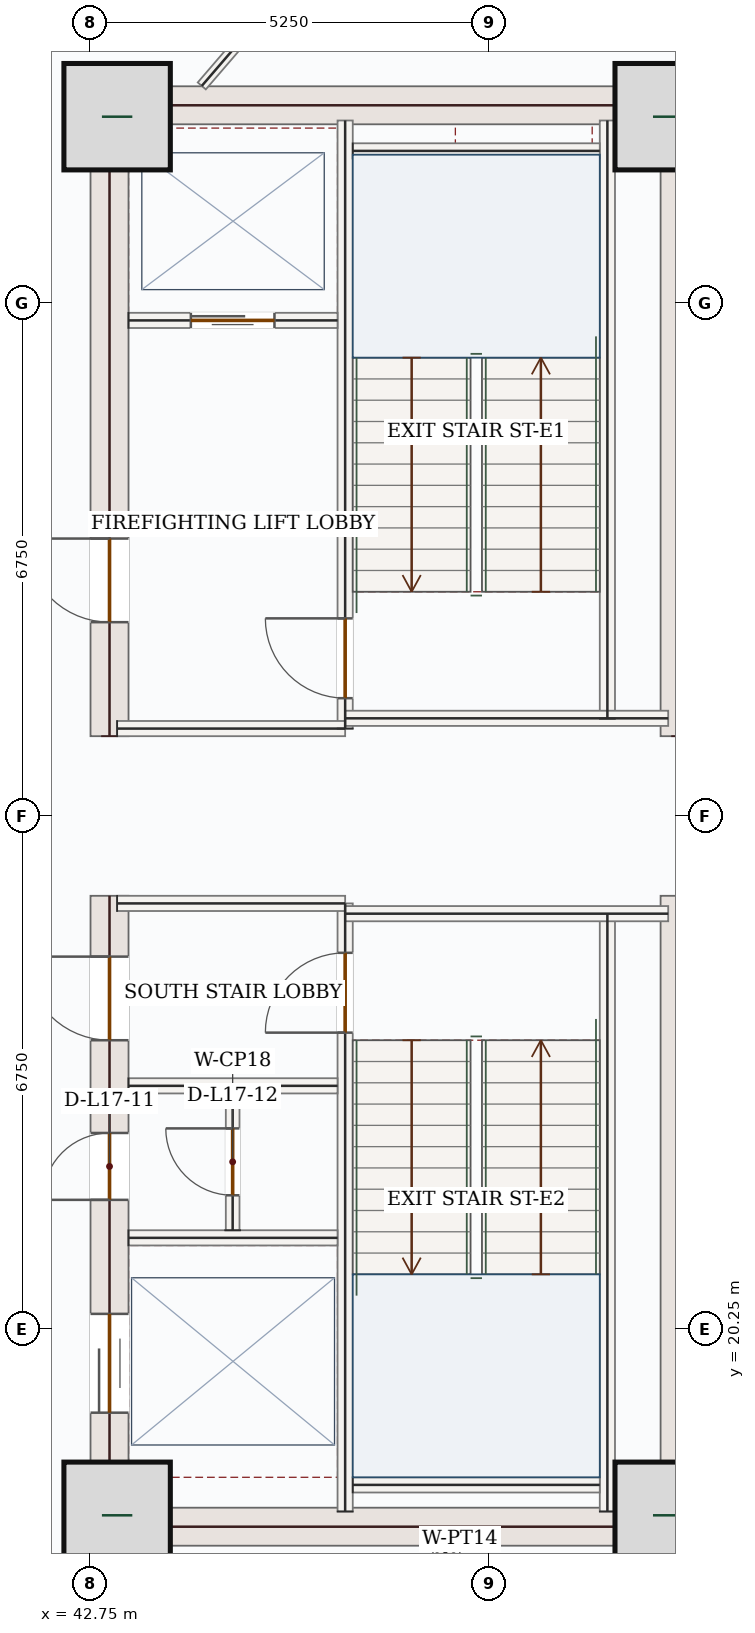
"""IFC4 building model, lengths in metres.
Left out: names, types, materials, properties, quantities, classifications, styles, units other than length and angle.
Written with IfcOpenShell. Run it as: python <this file> out.ifc"""

import sys

from ifc_helpers import new_model, si_unit, direction, frame, frame_2d, origin, origin_2d, place, context, subcontext, project, spatial, rectangle, extrude, source, transform, mapped, element, fill, save


model = new_model("IFC4")
c1 = context("Model", 3, precision=1e-05, world=origin(), true_north=direction((0.0, 1.0)))
c2 = subcontext(c1, "Body", "Model", "MODEL_VIEW")
j1 = project(units=[si_unit("LENGTHUNIT", "METRE"), si_unit("PLANEANGLEUNIT", "RADIAN")], contexts=[c1])
p1 = place(None, origin())
s1 = spatial("IfcSite", under=j1, at=p1, CompositionType="ELEMENT")
p2 = place(p1, origin())
s2 = spatial("IfcBuilding", under=s1, at=p2, CompositionType="ELEMENT")
p3 = place(p2, frame((0.0, 0.0, 79.5)))
s3 = spatial("IfcBuildingStorey", under=s2, at=p3, CompositionType="ELEMENT", Elevation=79.5)
p4 = place(p3, frame((43.0, 17.4, 0.0), z_axis=(0.0, 0.0, 1.0), x_axis=(0.0, 1.0, 0.0)))
e1 = element("IfcWall", 1, at=p4, inside=s3, PredefinedType="SHEAR", context=c2, shape_type="SweptSolid", body=[
    extrude(rectangle(XDim=8.55, YDim=0.5, at=frame_2d((4.275, 0.0))), origin(), (0.0, 0.0, 1.0), 3.95),
])
p5 = place(p4, frame((6.65, 0.0, 0.0)))
e2 = element("IfcOpeningElement", 2, at=p5, cuts=e1, PredefinedType="OPENING", context=c2, shape_type="SweptSolid", body=[
    extrude(rectangle(XDim=1.1, YDim=2.2, at=frame_2d((0.55, 1.1))), frame((0.0, 0.26, 0.0), z_axis=(0.0, -1.0, 0.0), x_axis=(1.0, 0.0, 0.0)), (0.0, 0.0, 1.0), 0.52),
])
p6 = place(p4, frame((1.75, 0.0, 0.0)))
e3 = element("IfcOpeningElement", 3, at=p6, cuts=e1, PredefinedType="OPENING", context=c2, shape_type="SweptSolid", body=[
    extrude(rectangle(XDim=1.3, YDim=2.2, at=frame_2d((0.65, 1.1))), frame((0.0, 0.26, 0.0), z_axis=(0.0, -1.0, 0.0), x_axis=(1.0, 0.0, 0.0)), (0.0, 0.0, 1.0), 0.52),
])
p7 = place(p4, frame((4.55, 0.0, 0.0)))
e4 = element("IfcOpeningElement", 4, at=p7, cuts=e1, PredefinedType="OPENING", context=c2, shape_type="SweptSolid", body=[
    extrude(rectangle(XDim=0.88, YDim=2.1, at=frame_2d((0.44, 1.05))), frame((0.0, 0.26, 0.0), z_axis=(0.0, -1.0, 0.0), x_axis=(1.0, 0.0, 0.0)), (0.0, 0.0, 1.0), 0.52),
])
p8 = place(p3, frame((43.0, 28.05, 0.0), z_axis=(0.0, 0.0, 1.0), x_axis=(0.0, 1.0, 0.0)))
e5 = element("IfcWall", 5, at=p8, inside=s3, PredefinedType="SHEAR", context=c2, shape_type="SweptSolid", body=[
    extrude(rectangle(XDim=8.55, YDim=0.5, at=frame_2d((4.275, 0.0))), origin(), (0.0, 0.0, 1.0), 3.95),
])
p9 = place(p8, frame((1.5, 0.0, 0.0)))
e6 = element("IfcOpeningElement", 6, at=p9, cuts=e5, PredefinedType="OPENING", context=c2, shape_type="SweptSolid", body=[
    extrude(rectangle(XDim=1.1, YDim=2.2, at=frame_2d((0.55, 1.1))), frame((0.0, 0.26, 0.0), z_axis=(0.0, -1.0, 0.0), x_axis=(1.0, 0.0, 0.0)), (0.0, 0.0, 1.0), 0.52),
])
m1 = source(origin(), c2, "Body", "SweptSolid", [
    extrude(rectangle(XDim=8.55, YDim=0.5, at=frame_2d((4.275, 0.0))), origin(), (0.0, 0.0, 1.0), 3.95),
])
for number, where, z_axis, x_axis in (
    (7, (50.5, 17.4, 0.0), (0.0, 0.0, 1.0), (0.0, 1.0, 0.0)),
    (8, (50.5, 28.05, 0.0), (0.0, 0.0, 1.0), (0.0, 1.0, 0.0)),
):
    element("IfcWall", number, at=place(p3, frame(where, z_axis=z_axis, x_axis=x_axis)), inside=s3, PredefinedType="SHEAR", context=c2, shape_type="MappedRepresentation", body=[
        mapped(m1, transform((0.0, 0.0, 0.0), x_axis=(1.0, 0.0, 0.0), y_axis=(0.0, 1.0, 0.0), z_axis=(0.0, 0.0, 1.0), scale=1.0)),
    ])
m2 = source(origin(), c2, "Body", "SweptSolid", [
    extrude(rectangle(XDim=7.0, YDim=0.5, at=frame_2d((3.5, 0.0))), origin(), (0.0, 0.0, 1.0), 3.95),
])
for number, where, z_axis, x_axis in (
    (9, (43.25, 17.65, 0.0), (0.0, 0.0, 1.0), (1.0, 0.0, 0.0)),
    (10, (43.25, 36.35, 0.0), (0.0, 0.0, 1.0), (1.0, 0.0, 0.0)),
):
    element("IfcWall", number, at=place(p3, frame(where, z_axis=z_axis, x_axis=x_axis)), inside=s3, PredefinedType="SHEAR", context=c2, shape_type="MappedRepresentation", body=[
        mapped(m2, transform((0.0, 0.0, 0.0), x_axis=(1.0, 0.0, 0.0), y_axis=(0.0, 1.0, 0.0), z_axis=(0.0, 0.0, 1.0), scale=1.0)),
    ])
m3 = source(origin(), c2, "Body", "SweptSolid", [
    extrude(rectangle(XDim=1.4, YDim=1.4, at=origin_2d()), origin(), (0.0, 0.0, 1.0), 4.2),
])
for number, where, z_axis, x_axis in (
    (11, (43.1, 17.8, 0.0), (0.0, 0.0, 1.0), (1.0, 0.0, 0.0)),
    (12, (50.35, 17.8, 0.0), (0.0, 0.0, 1.0), (1.0, 0.0, 0.0)),
    (13, (43.1, 36.2, 0.0), (0.0, 0.0, 1.0), (1.0, 0.0, 0.0)),
    (14, (50.35, 36.2, 0.0), (0.0, 0.0, 1.0), (1.0, 0.0, 0.0)),
):
    element("IfcColumn", number, at=place(p3, frame(where, z_axis=z_axis, x_axis=x_axis)), inside=s3, PredefinedType="COLUMN", context=c2, shape_type="MappedRepresentation", body=[
        mapped(m3, transform((0.0, 0.0, 0.0), x_axis=(1.0, 0.0, 0.0), y_axis=(0.0, 1.0, 0.0), z_axis=(0.0, 0.0, 1.0), scale=1.0)),
    ])
p10 = place(p3, frame((53.06, 18.458, 0.0), z_axis=(0.0, 0.0, 1.0), x_axis=(-0.707106781187, -0.707106781187, 0.0)))
e15 = element("IfcWall", 15, at=p10, inside=s3, PredefinedType="SOLIDWALL", context=c2, shape_type="SweptSolid", body=[
    extrude(rectangle(XDim=5.258, YDim=0.32, at=frame_2d((2.629, 0.0))), origin(), (0.0, 0.0, 1.0), 3.95),
])
p11 = place(p10, frame((1.429, 0.0, 0.85)))
e16 = element("IfcOpeningElement", 16, at=p11, cuts=e15, PredefinedType="OPENING", context=c2, shape_type="SweptSolid", body=[
    extrude(rectangle(XDim=2.4, YDim=1.8, at=frame_2d((1.2, 0.9))), frame((0.0, 0.17, 0.0), z_axis=(0.0, -1.0, 0.0), x_axis=(1.0, 0.0, 0.0)), (0.0, 0.0, 1.0), 0.34),
])
m4 = source(origin(), c2, "Body", "SweptSolid", [
    extrude(rectangle(XDim=5.623, YDim=0.32, at=frame_2d((2.812, 0.0))), origin(), (0.0, 0.0, 1.0), 3.95),
])
p12 = place(p3, frame((49.342, 39.26, 0.0), z_axis=(0.0, 0.0, 1.0), x_axis=(0.66122376427, -0.750188731963, 0.0)))
e17 = element("IfcWall", 17, at=p12, inside=s3, PredefinedType="SOLIDWALL", context=c2, shape_type="MappedRepresentation", body=[
    mapped(m4, transform((0.0, 0.0, 0.0), x_axis=(1.0, 0.0, 0.0), y_axis=(0.0, 1.0, 0.0), z_axis=(0.0, 0.0, 1.0), scale=1.0)),
])
m5 = source(origin(), c2, "Body", "SweptSolid", [
    extrude(rectangle(XDim=7.87, YDim=0.2, at=frame_2d((3.935, 0.0))), origin(), (0.0, 0.0, 1.0), 3.95),
])
for number, where, z_axis, x_axis in (
    (18, (49.55, 17.85, 0.0), (0.0, 0.0, 1.0), (0.0, 1.0, 0.0)),
    (19, (49.55, 28.28, 0.0), (0.0, 0.0, 1.0), (0.0, 1.0, 0.0)),
):
    element("IfcWall", number, at=place(p3, frame(where, z_axis=z_axis, x_axis=x_axis)), inside=s3, PredefinedType="SOLIDWALL", context=c2, shape_type="MappedRepresentation", body=[
        mapped(m5, transform((0.0, 0.0, 0.0), x_axis=(1.0, 0.0, 0.0), y_axis=(0.0, 1.0, 0.0), z_axis=(0.0, 0.0, 1.0), scale=1.0)),
    ])
p13 = place(p3, frame((46.1, 17.85, 0.0), z_axis=(0.0, 0.0, 1.0), x_axis=(0.0, 1.0, 0.0)))
e20 = element("IfcWall", 20, at=p13, inside=s3, PredefinedType="SOLIDWALL", context=c2, shape_type="SweptSolid", body=[
    extrude(rectangle(XDim=8.0, YDim=0.2, at=frame_2d((4.0, 0.0))), origin(), (0.0, 0.0, 1.0), 3.95),
])
p14 = place(p13, frame((6.3, 0.0, 0.0)))
e21 = element("IfcOpeningElement", 21, at=p14, cuts=e20, PredefinedType="OPENING", context=c2, shape_type="SweptSolid", body=[
    extrude(rectangle(XDim=1.05, YDim=2.15, at=frame_2d((0.525, 1.075))), frame((0.0, 0.11, 0.0), z_axis=(0.0, -1.0, 0.0), x_axis=(1.0, 0.0, 0.0)), (0.0, 0.0, 1.0), 0.22),
])
p15 = place(p3, frame((46.1, 28.15, 0.0), z_axis=(0.0, 0.0, 1.0), x_axis=(0.0, 1.0, 0.0)))
e22 = element("IfcWall", 22, at=p15, inside=s3, PredefinedType="SOLIDWALL", context=c2, shape_type="SweptSolid", body=[
    extrude(rectangle(XDim=8.0, YDim=0.2, at=frame_2d((4.0, 0.0))), origin(), (0.0, 0.0, 1.0), 3.95),
])
p16 = place(p15, frame((0.4, 0.0, 0.0)))
e23 = element("IfcOpeningElement", 23, at=p16, cuts=e22, PredefinedType="OPENING", context=c2, shape_type="SweptSolid", body=[
    extrude(rectangle(XDim=1.05, YDim=2.15, at=frame_2d((0.525, 1.075))), frame((0.0, 0.11, 0.0), z_axis=(0.0, -1.0, 0.0), x_axis=(1.0, 0.0, 0.0)), (0.0, 0.0, 1.0), 0.22),
])
m6 = source(origin(), c2, "Body", "SweptSolid", [
    extrude(rectangle(XDim=3.0, YDim=0.2, at=frame_2d((1.5, 0.0))), origin(), (0.0, 0.0, 1.0), 3.95),
])
p17 = place(p3, frame((43.1, 25.85, 0.0), z_axis=(0.0, 0.0, 1.0), x_axis=(1.0, 0.0, 0.0)))
e24 = element("IfcWall", 24, at=p17, inside=s3, PredefinedType="SOLIDWALL", context=c2, shape_type="MappedRepresentation", body=[
    mapped(m6, transform((0.0, 0.0, 0.0), x_axis=(1.0, 0.0, 0.0), y_axis=(0.0, 1.0, 0.0), z_axis=(0.0, 0.0, 1.0), scale=1.0)),
])
m7 = source(origin(), c2, "Body", "SweptSolid", [
    extrude(rectangle(XDim=4.25, YDim=0.2, at=frame_2d((2.125, 0.0))), origin(), (0.0, 0.0, 1.0), 3.95),
])
p18 = place(p3, frame((46.1, 25.715, 0.0), z_axis=(0.0, 0.0, 1.0), x_axis=(1.0, 0.0, 0.0)))
e25 = element("IfcWall", 25, at=p18, inside=s3, PredefinedType="SOLIDWALL", context=c2, shape_type="MappedRepresentation", body=[
    mapped(m7, transform((0.0, 0.0, 0.0), x_axis=(1.0, 0.0, 0.0), y_axis=(0.0, 1.0, 0.0), z_axis=(0.0, 0.0, 1.0), scale=1.0)),
])
p19 = place(p3, frame((43.1, 28.15, 0.0), z_axis=(0.0, 0.0, 1.0), x_axis=(1.0, 0.0, 0.0)))
e26 = element("IfcWall", 26, at=p19, inside=s3, PredefinedType="SOLIDWALL", context=c2, shape_type="MappedRepresentation", body=[
    mapped(m6, transform((0.0, 0.0, 0.0), x_axis=(1.0, 0.0, 0.0), y_axis=(0.0, 1.0, 0.0), z_axis=(0.0, 0.0, 1.0), scale=1.0)),
])
p20 = place(p3, frame((46.1, 28.285, 0.0), z_axis=(0.0, 0.0, 1.0), x_axis=(1.0, 0.0, 0.0)))
e27 = element("IfcWall", 27, at=p20, inside=s3, PredefinedType="SOLIDWALL", context=c2, shape_type="MappedRepresentation", body=[
    mapped(m7, transform((0.0, 0.0, 0.0), x_axis=(1.0, 0.0, 0.0), y_axis=(0.0, 1.0, 0.0), z_axis=(0.0, 0.0, 1.0), scale=1.0)),
])
m8 = source(origin(), c2, "Body", "SweptSolid", [
    extrude(rectangle(XDim=3.25, YDim=0.2, at=frame_2d((1.625, 0.0))), origin(), (0.0, 0.0, 1.0), 3.95),
])
for number, where, z_axis, x_axis in (
    (28, (46.2, 35.75, 0.0), (0.0, 0.0, 1.0), (1.0, 0.0, 0.0)),
    (29, (46.2, 18.2, 0.0), (0.0, 0.0, 1.0), (1.0, 0.0, 0.0)),
):
    element("IfcWall", number, at=place(p3, frame(where, z_axis=z_axis, x_axis=x_axis)), inside=s3, PredefinedType="SOLIDWALL", context=c2, shape_type="MappedRepresentation", body=[
        mapped(m8, transform((0.0, 0.0, 0.0), x_axis=(1.0, 0.0, 0.0), y_axis=(0.0, 1.0, 0.0), z_axis=(0.0, 0.0, 1.0), scale=1.0)),
    ])
p21 = place(p3, frame((43.25, 33.52, 0.0), z_axis=(0.0, 0.0, 1.0), x_axis=(1.0, 0.0, 0.0)))
e30 = element("IfcWall", 30, at=p21, inside=s3, PredefinedType="SOLIDWALL", context=c2, shape_type="SweptSolid", body=[
    extrude(rectangle(XDim=2.75, YDim=0.2, at=frame_2d((1.375, 0.0))), origin(), (0.0, 0.0, 1.0), 3.95),
])
p22 = place(p21, frame((0.82, 0.0, 0.0)))
e31 = element("IfcOpeningElement", 31, at=p22, cuts=e30, PredefinedType="OPENING", context=c2, shape_type="SweptSolid", body=[
    extrude(rectangle(XDim=1.1, YDim=2.15, at=frame_2d((0.55, 1.075))), frame((0.0, 0.11, 0.0), z_axis=(0.0, -1.0, 0.0), x_axis=(1.0, 0.0, 0.0)), (0.0, 0.0, 1.0), 0.22),
])
m9 = source(origin(), c2, "Body", "SweptSolid", [
    extrude(rectangle(XDim=2.75, YDim=0.2, at=frame_2d((1.375, 0.0))), origin(), (0.0, 0.0, 1.0), 3.95),
])
for number, where, z_axis, x_axis in (
    (32, (43.25, 23.45, 0.0), (0.0, 0.0, 1.0), (1.0, 0.0, 0.0)),
    (33, (43.25, 21.45, 0.0), (0.0, 0.0, 1.0), (1.0, 0.0, 0.0)),
):
    element("IfcWall", number, at=place(p3, frame(where, z_axis=z_axis, x_axis=x_axis)), inside=s3, PredefinedType="SOLIDWALL", context=c2, shape_type="MappedRepresentation", body=[
        mapped(m9, transform((0.0, 0.0, 0.0), x_axis=(1.0, 0.0, 0.0), y_axis=(0.0, 1.0, 0.0), z_axis=(0.0, 0.0, 1.0), scale=1.0)),
    ])
p23 = place(p3, frame((44.62, 21.55, 0.0), z_axis=(0.0, 0.0, 1.0), x_axis=(0.0, 1.0, 0.0)))
e34 = element("IfcWall", 34, at=p23, inside=s3, PredefinedType="PARTITIONING", context=c2, shape_type="SweptSolid", body=[
    extrude(rectangle(XDim=1.8, YDim=0.18, at=frame_2d((0.9, 0.0))), origin(), (0.0, 0.0, 1.0), 3.95),
])
p24 = place(p23, frame((0.46, 0.0, 0.0)))
e35 = element("IfcOpeningElement", 35, at=p24, cuts=e34, PredefinedType="OPENING", context=c2, shape_type="SweptSolid", body=[
    extrude(rectangle(XDim=0.88, YDim=2.1, at=frame_2d((0.44, 1.05))), frame((0.0, 0.1, 0.0), z_axis=(0.0, -1.0, 0.0), x_axis=(1.0, 0.0, 0.0)), (0.0, 0.0, 1.0), 0.2),
])
m10 = source(origin(), c2, "Body", "SweptSolid", [
    extrude(rectangle(XDim=0.761, YDim=0.14, at=frame_2d((0.38, 0.0))), origin(), (0.0, 0.0, 1.0), 3.95),
])
p25 = place(p3, frame((47.318, 17.395, 0.0), z_axis=(0.0, 0.0, 1.0), x_axis=(0.764128340752, -0.645064243978, 0.0)))
e36 = element("IfcWall", 36, at=p25, inside=s3, PredefinedType="PARTITIONING", context=c2, shape_type="MappedRepresentation", body=[
    mapped(m10, transform((0.0, 0.0, 0.0), x_axis=(1.0, 0.0, 0.0), y_axis=(0.0, 1.0, 0.0), z_axis=(0.0, 0.0, 1.0), scale=1.0)),
])
m11 = source(origin(), c2, "Body", "SweptSolid", [
    extrude(rectangle(XDim=3.29, YDim=0.14, at=frame_2d((1.645, 0.0))), origin(), (0.0, 0.0, 1.0), 3.95),
])
p26 = place(p3, frame((46.36, 39.099, 0.0), z_axis=(0.0, 0.0, 1.0), x_axis=(-0.652214149627, -0.758034763732, 0.0)))
e37 = element("IfcWall", 37, at=p26, inside=s3, PredefinedType="PARTITIONING", context=c2, shape_type="MappedRepresentation", body=[
    mapped(m11, transform((0.0, 0.0, 0.0), x_axis=(1.0, 0.0, 0.0), y_axis=(0.0, 1.0, 0.0), z_axis=(0.0, 0.0, 1.0), scale=1.0)),
])
m12 = source(origin(), c2, "Body", "SweptSolid", [
    extrude(rectangle(XDim=5.09, YDim=0.14, at=frame_2d((2.545, 0.0))), origin(), (0.0, 0.0, 1.0), 3.95),
])
p27 = place(p3, frame((49.932, 38.84, 0.0), z_axis=(0.0, 0.0, 1.0), x_axis=(0.707106781187, -0.707106781187, 0.0)))
e38 = element("IfcWall", 38, at=p27, inside=s3, PredefinedType="PARTITIONING", context=c2, shape_type="MappedRepresentation", body=[
    mapped(m12, transform((0.0, 0.0, 0.0), x_axis=(1.0, 0.0, 0.0), y_axis=(0.0, 1.0, 0.0), z_axis=(0.0, 0.0, 1.0), scale=1.0)),
])
m13 = source(origin(), c2, "Body", "SweptSolid", [
    extrude(rectangle(XDim=2.4, YDim=1.8, at=frame_2d((1.2, 0.9))), frame((0.0, 0.03, 0.0), z_axis=(0.0, -1.0, 0.0), x_axis=(1.0, 0.0, 0.0)), (0.0, 0.0, 1.0), 0.06),
])
p28 = place(p11, origin())
e39 = element("IfcWindow", 39, at=p28, inside=s3, PartitioningType="DOUBLE_PANEL_VERTICAL", PredefinedType="WINDOW", context=c2, shape_type="MappedRepresentation", body=[
    mapped(m13, transform((0.0, 0.0, 0.0), x_axis=(1.0, 0.0, 0.0), y_axis=(0.0, 1.0, 0.0), z_axis=(0.0, 0.0, 1.0), scale=1.0)),
])
fill(e16, e39)
m14 = source(origin(), c2, "Body", "SweptSolid", [
    extrude(rectangle(XDim=1.05, YDim=2.15, at=frame_2d((0.525, 1.075))), frame((0.0, 0.025, 0.0), z_axis=(0.0, -1.0, 0.0), x_axis=(1.0, 0.0, 0.0)), (0.0, 0.0, 1.0), 0.05),
])
p29 = place(p16, origin())
e40 = element("IfcDoor", 40, at=p29, inside=s3, OperationType="SINGLE_SWING_RIGHT", PredefinedType="DOOR", context=c2, shape_type="MappedRepresentation", body=[
    mapped(m14, transform((0.0, 0.0, 0.0), x_axis=(1.0, 0.0, 0.0), y_axis=(0.0, 1.0, 0.0), z_axis=(0.0, 0.0, 1.0), scale=1.0)),
])
fill(e23, e40)
p30 = place(p14, origin())
e41 = element("IfcDoor", 41, at=p30, inside=s3, OperationType="SINGLE_SWING_LEFT", PredefinedType="DOOR", context=c2, shape_type="MappedRepresentation", body=[
    mapped(m14, transform((0.0, 0.0, 0.0), x_axis=(1.0, 0.0, 0.0), y_axis=(0.0, 1.0, 0.0), z_axis=(0.0, 0.0, 1.0), scale=1.0)),
])
fill(e21, e41)
m15 = source(origin(), c2, "Body", "SweptSolid", [
    extrude(rectangle(XDim=1.1, YDim=2.15, at=frame_2d((0.55, 1.075))), frame((0.0, 0.025, 0.0), z_axis=(0.0, -1.0, 0.0), x_axis=(1.0, 0.0, 0.0)), (0.0, 0.0, 1.0), 0.05),
])
p31 = place(p22, origin())
e42 = element("IfcDoor", 42, at=p31, inside=s3, OperationType="DOUBLE_DOOR_SLIDING", PredefinedType="DOOR", context=c2, shape_type="MappedRepresentation", body=[
    mapped(m15, transform((0.0, 0.0, 0.0), x_axis=(1.0, 0.0, 0.0), y_axis=(0.0, 1.0, 0.0), z_axis=(0.0, 0.0, 1.0), scale=1.0)),
])
fill(e31, e42)
m16 = source(origin(), c2, "Body", "SweptSolid", [
    extrude(rectangle(XDim=1.1, YDim=2.2, at=frame_2d((0.55, 1.1))), frame((0.0, 0.025, 0.0), z_axis=(0.0, -1.0, 0.0), x_axis=(1.0, 0.0, 0.0)), (0.0, 0.0, 1.0), 0.05),
])
p32 = place(p9, origin())
e43 = element("IfcDoor", 43, at=p32, inside=s3, OperationType="SINGLE_SWING_RIGHT", PredefinedType="DOOR", context=c2, shape_type="MappedRepresentation", body=[
    mapped(m16, transform((0.0, 0.0, 0.0), x_axis=(1.0, 0.0, 0.0), y_axis=(0.0, 1.0, 0.0), z_axis=(0.0, 0.0, 1.0), scale=1.0)),
])
fill(e6, e43)
p33 = place(p5, origin())
e44 = element("IfcDoor", 44, at=p33, inside=s3, OperationType="SINGLE_SWING_RIGHT", PredefinedType="DOOR", context=c2, shape_type="MappedRepresentation", body=[
    mapped(m16, transform((0.0, 0.0, 0.0), x_axis=(1.0, 0.0, 0.0), y_axis=(0.0, 1.0, 0.0), z_axis=(0.0, 0.0, 1.0), scale=1.0)),
])
fill(e2, e44)
m17 = source(origin(), c2, "Body", "SweptSolid", [
    extrude(rectangle(XDim=1.3, YDim=2.2, at=frame_2d((0.65, 1.1))), frame((0.0, 0.025, 0.0), z_axis=(0.0, -1.0, 0.0), x_axis=(1.0, 0.0, 0.0)), (0.0, 0.0, 1.0), 0.05),
])
p34 = place(p6, origin())
e45 = element("IfcDoor", 45, at=p34, inside=s3, OperationType="DOUBLE_DOOR_SLIDING", PredefinedType="DOOR", context=c2, shape_type="MappedRepresentation", body=[
    mapped(m17, transform((0.0, 0.0, 0.0), x_axis=(1.0, 0.0, 0.0), y_axis=(0.0, 1.0, 0.0), z_axis=(0.0, 0.0, 1.0), scale=1.0)),
])
fill(e3, e45)
m18 = source(origin(), c2, "Body", "SweptSolid", [
    extrude(rectangle(XDim=0.88, YDim=2.1, at=frame_2d((0.44, 1.05))), frame((0.0, 0.025, 0.0), z_axis=(0.0, -1.0, 0.0), x_axis=(1.0, 0.0, 0.0)), (0.0, 0.0, 1.0), 0.05),
])
p35 = place(p7, origin())
e46 = element("IfcDoor", 46, at=p35, inside=s3, OperationType="SINGLE_SWING_LEFT", PredefinedType="DOOR", context=c2, shape_type="MappedRepresentation", body=[
    mapped(m18, transform((0.0, 0.0, 0.0), x_axis=(1.0, 0.0, 0.0), y_axis=(0.0, 1.0, 0.0), z_axis=(0.0, 0.0, 1.0), scale=1.0)),
])
fill(e4, e46)
p36 = place(p24, origin())
e47 = element("IfcDoor", 47, at=p36, inside=s3, OperationType="SINGLE_SWING_RIGHT", PredefinedType="DOOR", context=c2, shape_type="MappedRepresentation", body=[
    mapped(m18, transform((0.0, 0.0, 0.0), x_axis=(1.0, 0.0, 0.0), y_axis=(0.0, 1.0, 0.0), z_axis=(0.0, 0.0, 1.0), scale=1.0)),
])
fill(e35, e47)
save(model, sys.argv[1])
